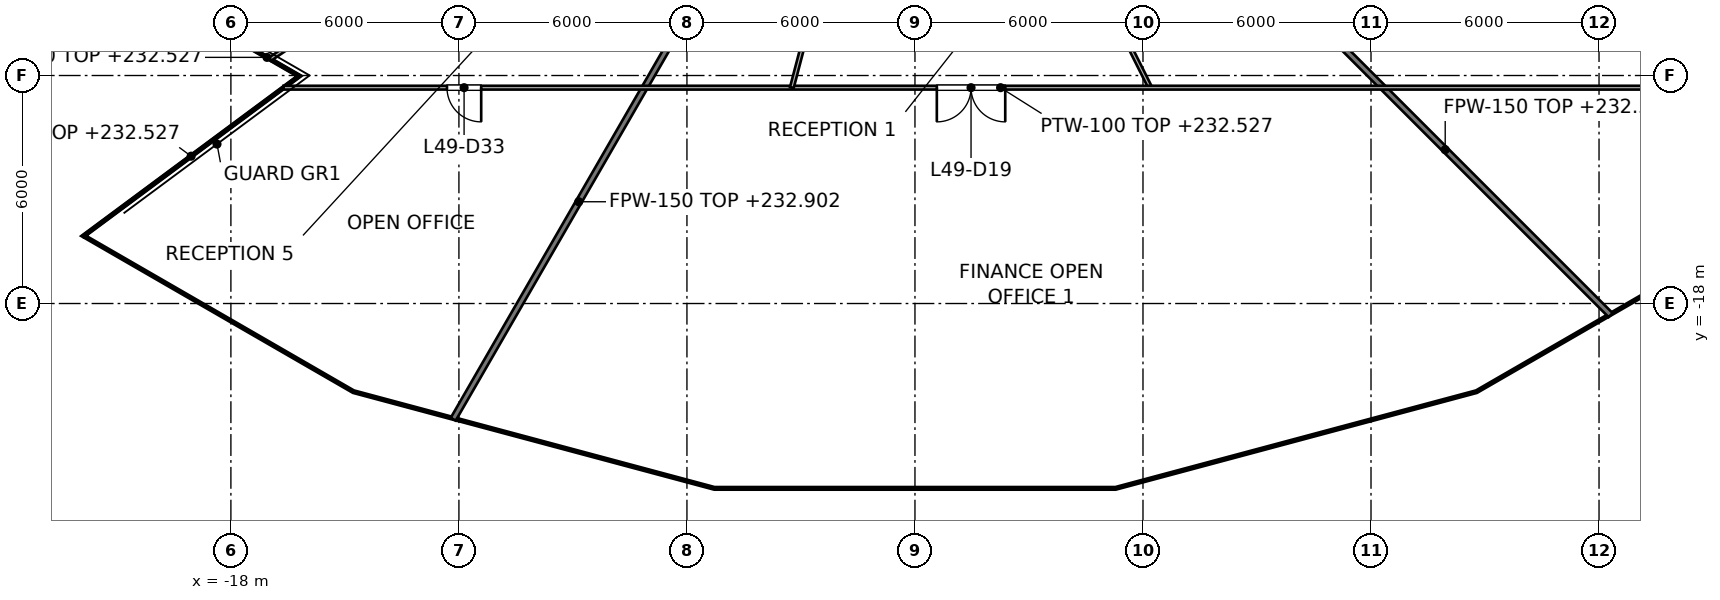
"""IFC4 building model, lengths in metres.
Left out: names, types, materials, properties, quantities, classifications, styles, units other than length and angle.
Written with IfcOpenShell. Run it as: python <this file> out.ifc"""

import sys

from ifc_helpers import new_model, si_unit, direction, frame, frame_2d, origin, place, context, subcontext, project, spatial, rectangle, extrude, element, fill, save


model = new_model("IFC4")
c1 = context("Model", 3, precision=1e-05, world=origin(), true_north=direction((0.0, 1.0)))
c2 = subcontext(c1, "Body", "Model", "MODEL_VIEW")
j1 = project(units=[si_unit("LENGTHUNIT", "METRE"), si_unit("PLANEANGLEUNIT", "RADIAN")], contexts=[c1])
p1 = place(None, origin())
s1 = spatial("IfcSite", under=j1, at=p1, CompositionType="ELEMENT")
p2 = place(p1, origin())
s2 = spatial("IfcBuilding", under=s1, at=p2, CompositionType="ELEMENT")
p3 = place(p2, frame((0.0, 0.0, 229.6)))
s3 = spatial("IfcBuildingStorey", under=s2, at=p3, CompositionType="ELEMENT", Elevation=229.6)
p4 = place(p3, frame((9.6, -9.6, 0.0), z_axis=(0.0, 0.0, 1.0), x_axis=(0.707106781187, -0.707106781187, 0.0)))
e1 = element("IfcWall", 1, at=p4, inside=s3, PredefinedType="PARTITIONING", context=c2, shape_type="SweptSolid", body=[
    extrude(rectangle(XDim=12.311, YDim=0.15, at=frame_2d((6.155, 0.0))), origin(), (0.0, 0.0, 1.0), 2.927),
])
p5 = place(p3, frame((-12.15, -21.044, 0.0), z_axis=(0.0, 0.0, 1.0), x_axis=(0.499954356739, 0.86605175433, 0.0)))
e2 = element("IfcWall", 2, at=p5, inside=s3, PredefinedType="PARTITIONING", context=c2, shape_type="SweptSolid", body=[
    extrude(rectangle(XDim=13.214, YDim=0.15, at=frame_2d((6.607, 0.0))), origin(), (0.0, 0.0, 1.0), 3.302),
])
p6 = place(p3, frame((-17.901, -11.032, 0.0), z_axis=(0.0, 0.0, 1.0), x_axis=(0.866137951632, -0.499805010722, 0.0)))
e3 = element("IfcWall", 3, at=p6, inside=s3, PredefinedType="PARTITIONING", context=c2, shape_type="SweptSolid", body=[
    extrude(rectangle(XDim=1.963, YDim=0.05, at=frame_2d((0.981, 0.0))), origin(), (0.0, 0.0, 1.0), 2.927),
])
p7 = place(p3, frame((-21.892, -16.233, 0.0), z_axis=(0.0, 0.0, 1.0), x_axis=(0.803267144232, 0.595618917595, 0.0)))
e4 = element("IfcWall", 4, at=p7, inside=s3, PredefinedType="PARTITIONING", context=c2, shape_type="SweptSolid", body=[
    extrude(rectangle(XDim=7.085, YDim=0.05, at=frame_2d((3.542, 0.0))), origin(), (0.0, 0.0, 1.0), 2.927),
])
p8 = place(p3, frame((4.824, -9.6, 0.0), z_axis=(0.0, 0.0, 1.0), x_axis=(0.449041226729, -0.893511038934, 0.0)))
e5 = element("IfcWall", 5, at=p8, inside=s3, PredefinedType="PARTITIONING", context=c2, shape_type="SweptSolid", body=[
    extrude(rectangle(XDim=3.044, YDim=0.1, at=frame_2d((1.522, 0.0))), origin(), (0.0, 0.0, 1.0), 3.85),
])
p9 = place(p3, frame((-16.615, -12.32, 0.0), z_axis=(0.0, 0.0, 1.0), x_axis=(1.0, 0.0, 0.0)))
e6 = element("IfcWall", 6, at=p9, inside=s3, PredefinedType="PARTITIONING", context=c2, shape_type="SweptSolid", body=[
    extrude(rectangle(XDim=37.735, YDim=0.1, at=frame_2d((18.868, 0.0))), origin(), (0.0, 0.0, 1.0), 2.927),
])
p10 = place(p9, frame((17.19, 0.0, 0.0)))
e7 = element("IfcOpeningElement", 7, at=p10, cuts=e6, PredefinedType="OPENING", context=c2, shape_type="SweptSolid", body=[
    extrude(rectangle(XDim=1.8, YDim=2.1, at=frame_2d((0.9, 1.05))), frame((0.0, 0.05, 0.0), z_axis=(0.0, -1.0, 0.0), x_axis=(1.0, 0.0, 0.0)), (0.0, 0.0, 1.0), 0.1),
])
p11 = place(p9, frame((4.301, 0.0, 0.0)))
e8 = element("IfcOpeningElement", 8, at=p11, cuts=e6, PredefinedType="OPENING", context=c2, shape_type="SweptSolid", body=[
    extrude(rectangle(XDim=0.9, YDim=2.1, at=frame_2d((0.45, 1.05))), frame((0.0, 0.05, 0.0), z_axis=(0.0, -1.0, 0.0), x_axis=(1.0, 0.0, 0.0)), (0.0, 0.0, 1.0), 0.1),
])
p12 = place(p3, frame((-16.969, -11.57, 0.0), z_axis=(0.0, 0.0, 1.0), x_axis=(0.826104689434, 0.563516674194, 0.0)))
e9 = element("IfcWall", 9, at=p12, inside=s3, PredefinedType="PARTITIONING", context=c2, shape_type="SweptSolid", body=[
    extrude(rectangle(XDim=3.496, YDim=0.1, at=frame_2d((1.748, 0.0))), origin(), (0.0, 0.0, 1.0), 3.85),
])
p13 = place(p3, frame((-3.24, -12.32, 0.0), z_axis=(0.0, 0.0, 1.0), x_axis=(0.254262551931, 0.967135230816, 0.0)))
e10 = element("IfcWall", 10, at=p13, inside=s3, PredefinedType="PARTITIONING", context=c2, shape_type="SweptSolid", body=[
    extrude(rectangle(XDim=2.812, YDim=0.1, at=frame_2d((1.406, 0.0))), origin(), (0.0, 0.0, 1.0), 3.85),
])
p14 = place(p10, origin())
e11 = element("IfcDoor", 11, at=p14, inside=s3, OperationType="DOUBLE_DOOR_SINGLE_SWING", PredefinedType="DOOR", context=c2, shape_type="SweptSolid", body=[
    extrude(rectangle(XDim=1.8, YDim=2.1, at=frame_2d((0.9, 1.05))), frame((0.0, 0.025, 0.0), z_axis=(0.0, -1.0, 0.0), x_axis=(1.0, 0.0, 0.0)), (0.0, 0.0, 1.0), 0.05),
])
fill(e7, e11)
p15 = place(p11, origin())
e12 = element("IfcDoor", 12, at=p15, inside=s3, OperationType="SINGLE_SWING_RIGHT", PredefinedType="DOOR", context=c2, shape_type="SweptSolid", body=[
    extrude(rectangle(XDim=0.9, YDim=2.1, at=frame_2d((0.45, 1.05))), frame((0.0, 0.025, 0.0), z_axis=(0.0, -1.0, 0.0), x_axis=(1.0, 0.0, 0.0)), (0.0, 0.0, 1.0), 0.05),
])
fill(e8, e12)
save(model, sys.argv[1])
